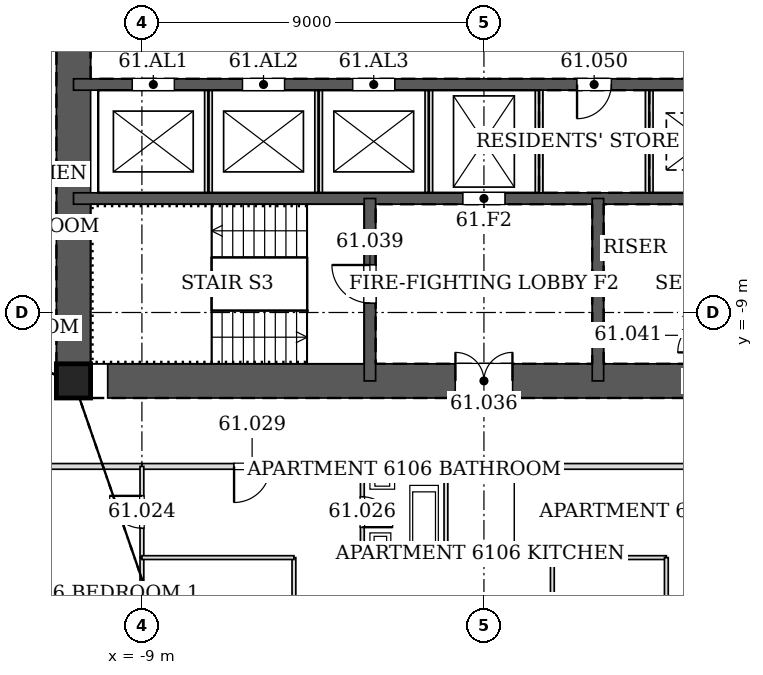
"""IFC4 building model, lengths in metres.
Left out: names, types, materials, properties, quantities, classifications, styles, units other than length and angle.
Written with IfcOpenShell. Run it as: python <this file> out.ifc"""

import sys

from ifc_helpers import new_model, si_unit, direction, frame, frame_2d, origin, origin_2d, place, context, subcontext, project, spatial, rectangle, hollow_rectangle, extrude, element, fill, save


model = new_model("IFC4")
c1 = context("Model", 3, precision=1e-05, world=origin(), true_north=direction((0.0, 1.0)))
c2 = subcontext(c1, "Body", "Model", "MODEL_VIEW")
j1 = project(units=[si_unit("LENGTHUNIT", "METRE"), si_unit("PLANEANGLEUNIT", "RADIAN")], contexts=[c1])
p1 = place(None, origin())
s1 = spatial("IfcSite", under=j1, at=p1, CompositionType="ELEMENT")
p2 = place(p1, origin())
s2 = spatial("IfcBuilding", under=s1, at=p2, CompositionType="ELEMENT")
p3 = place(p2, frame((0.0, 0.0, 255.0)))
s3 = spatial("IfcBuildingStorey", under=s2, at=p3, CompositionType="ELEMENT", Elevation=255.0)
p4 = place(p3, frame((-10.8, -10.8, 0.0), z_axis=(0.0, 0.0, 1.0), x_axis=(1.0, 0.0, 0.0)))
e1 = element("IfcColumn", 1, at=p4, inside=s3, PredefinedType="COLUMN", context=c2, shape_type="SweptSolid", body=[
    extrude(hollow_rectangle(XDim=0.9, YDim=0.9, WallThickness=0.04, at=origin_2d()), origin(), (0.0, 0.0, 1.0), 3.4),
])
p5 = place(p3, frame((-10.8, -10.8, 0.0), z_axis=(0.0, 0.0, 1.0), x_axis=(1.0, 0.0, 0.0)))
e2 = element("IfcWall", 2, at=p5, inside=s3, PredefinedType="SOLIDWALL", context=c2, shape_type="SweptSolid", body=[
    extrude(rectangle(XDim=21.6, YDim=0.9, at=frame_2d((10.8, 0.0))), origin(), (0.0, 0.0, 1.0), 3.4),
])
p6 = place(p5, frame((10.05, 0.0, 0.0)))
e3 = element("IfcOpeningElement", 3, at=p6, cuts=e2, PredefinedType="OPENING", context=c2, shape_type="SweptSolid", body=[
    extrude(rectangle(XDim=1.5, YDim=2.1, at=frame_2d((0.75, 1.05))), frame((0.0, 0.46, 0.0), z_axis=(0.0, -1.0, 0.0), x_axis=(1.0, 0.0, 0.0)), (0.0, 0.0, 1.0), 0.92),
])
p7 = place(p5, frame((17.1, 0.0, 0.0)))
e4 = element("IfcOpeningElement", 4, at=p7, cuts=e2, PredefinedType="OPENING", context=c2, shape_type="SweptSolid", body=[
    extrude(rectangle(XDim=0.9, YDim=2.1, at=frame_2d((0.45, 1.05))), frame((0.0, 0.46, 0.0), z_axis=(0.0, -1.0, 0.0), x_axis=(1.0, 0.0, 0.0)), (0.0, 0.0, 1.0), 0.92),
])
p8 = place(p3, frame((-10.8, 10.8, 0.0), z_axis=(0.0, 0.0, 1.0), x_axis=(0.0, -1.0, 0.0)))
e5 = element("IfcWall", 5, at=p8, inside=s3, PredefinedType="SOLIDWALL", context=c2, shape_type="SweptSolid", body=[
    extrude(rectangle(XDim=21.6, YDim=0.9, at=frame_2d((10.8, 0.0))), origin(), (0.0, 0.0, 1.0), 3.4),
])
p9 = place(p8, frame((8.7, 0.0, 0.0)))
e6 = element("IfcOpeningElement", 6, at=p9, cuts=e5, PredefinedType="OPENING", context=c2, shape_type="SweptSolid", body=[
    extrude(rectangle(XDim=1.2, YDim=2.1, at=frame_2d((0.6, 1.05))), frame((0.0, 0.46, 0.0), z_axis=(0.0, -1.0, 0.0), x_axis=(1.0, 0.0, 0.0)), (0.0, 0.0, 1.0), 0.92),
])
p10 = place(p8, frame((11.7, 0.0, 0.0)))
e7 = element("IfcOpeningElement", 7, at=p10, cuts=e5, PredefinedType="OPENING", context=c2, shape_type="SweptSolid", body=[
    extrude(rectangle(XDim=1.2, YDim=2.1, at=frame_2d((0.6, 1.05))), frame((0.0, 0.46, 0.0), z_axis=(0.0, -1.0, 0.0), x_axis=(1.0, 0.0, 0.0)), (0.0, 0.0, 1.0), 0.92),
])
p11 = place(p3, frame((-10.8, -3.0, 0.0), z_axis=(0.0, 0.0, 1.0), x_axis=(1.0, 0.0, 0.0)))
e8 = element("IfcWall", 8, at=p11, inside=s3, PredefinedType="SOLIDWALL", context=c2, shape_type="SweptSolid", body=[
    extrude(rectangle(XDim=21.6, YDim=0.3, at=frame_2d((10.8, 0.0))), origin(), (0.0, 0.0, 1.0), 3.4),
])
p12 = place(p11, frame((13.25, 0.0, 0.0)))
e9 = element("IfcOpeningElement", 9, at=p12, cuts=e8, PredefinedType="OPENING", context=c2, shape_type="SweptSolid", body=[
    extrude(rectangle(XDim=0.9, YDim=2.1, at=frame_2d((0.45, 1.05))), frame((0.0, 0.16, 0.0), z_axis=(0.0, -1.0, 0.0), x_axis=(1.0, 0.0, 0.0)), (0.0, 0.0, 1.0), 0.32),
])
p13 = place(p11, frame((1.55, 0.0, 0.0)))
e10 = element("IfcOpeningElement", 10, at=p13, cuts=e8, PredefinedType="OPENING", context=c2, shape_type="SweptSolid", body=[
    extrude(rectangle(XDim=1.1, YDim=2.1, at=frame_2d((0.55, 1.05))), frame((0.0, 0.16, 0.0), z_axis=(0.0, -1.0, 0.0), x_axis=(1.0, 0.0, 0.0)), (0.0, 0.0, 1.0), 0.32),
])
p14 = place(p11, frame((4.45, 0.0, 0.0)))
e11 = element("IfcOpeningElement", 11, at=p14, cuts=e8, PredefinedType="OPENING", context=c2, shape_type="SweptSolid", body=[
    extrude(rectangle(XDim=1.1, YDim=2.1, at=frame_2d((0.55, 1.05))), frame((0.0, 0.16, 0.0), z_axis=(0.0, -1.0, 0.0), x_axis=(1.0, 0.0, 0.0)), (0.0, 0.0, 1.0), 0.32),
])
p15 = place(p11, frame((7.35, 0.0, 0.0)))
e12 = element("IfcOpeningElement", 12, at=p15, cuts=e8, PredefinedType="OPENING", context=c2, shape_type="SweptSolid", body=[
    extrude(rectangle(XDim=1.1, YDim=2.1, at=frame_2d((0.55, 1.05))), frame((0.0, 0.16, 0.0), z_axis=(0.0, -1.0, 0.0), x_axis=(1.0, 0.0, 0.0)), (0.0, 0.0, 1.0), 0.32),
])
p16 = place(p3, frame((-10.8, -6.0, 0.0), z_axis=(0.0, 0.0, 1.0), x_axis=(1.0, 0.0, 0.0)))
e13 = element("IfcWall", 13, at=p16, inside=s3, PredefinedType="SOLIDWALL", context=c2, shape_type="SweptSolid", body=[
    extrude(rectangle(XDim=21.6, YDim=0.3, at=frame_2d((10.8, 0.0))), origin(), (0.0, 0.0, 1.0), 3.4),
])
p17 = place(p16, frame((10.25, 0.0, 0.0)))
e14 = element("IfcOpeningElement", 14, at=p17, cuts=e13, PredefinedType="OPENING", context=c2, shape_type="SweptSolid", body=[
    extrude(rectangle(XDim=1.1, YDim=2.1, at=frame_2d((0.55, 1.05))), frame((0.0, 0.16, 0.0), z_axis=(0.0, -1.0, 0.0), x_axis=(1.0, 0.0, 0.0)), (0.0, 0.0, 1.0), 0.32),
])
p18 = place(p3, frame((-3.0, -6.0, 0.0), z_axis=(0.0, 0.0, 1.0), x_axis=(0.0, -1.0, 0.0)))
e15 = element("IfcWall", 15, at=p18, inside=s3, PredefinedType="SOLIDWALL", context=c2, shape_type="SweptSolid", body=[
    extrude(rectangle(XDim=4.8, YDim=0.3, at=frame_2d((2.4, 0.0))), origin(), (0.0, 0.0, 1.0), 3.4),
])
p19 = place(p18, frame((1.75, 0.0, 0.0)))
e16 = element("IfcOpeningElement", 16, at=p19, cuts=e15, PredefinedType="OPENING", context=c2, shape_type="SweptSolid", body=[
    extrude(rectangle(XDim=1.0, YDim=2.1, at=frame_2d((0.5, 1.05))), frame((0.0, 0.16, 0.0), z_axis=(0.0, -1.0, 0.0), x_axis=(1.0, 0.0, 0.0)), (0.0, 0.0, 1.0), 0.32),
])
p20 = place(p3, frame((3.0, -6.0, 0.0), z_axis=(0.0, 0.0, 1.0), x_axis=(0.0, -1.0, 0.0)))
e17 = element("IfcWall", 17, at=p20, inside=s3, PredefinedType="SOLIDWALL", context=c2, shape_type="SweptSolid", body=[
    extrude(rectangle(XDim=4.8, YDim=0.3, at=frame_2d((2.4, 0.0))), origin(), (0.0, 0.0, 1.0), 3.4),
])
p21 = place(p3, frame((-13.05, -13.05, 0.0), z_axis=(0.0, 0.0, 1.0), x_axis=(1.0, 0.0, 0.0)))
e18 = element("IfcWall", 18, at=p21, inside=s3, PredefinedType="PARTITIONING", context=c2, shape_type="SweptSolid", body=[
    extrude(rectangle(XDim=4.051, YDim=0.15, at=frame_2d((2.025, 0.0))), origin(), (0.0, 0.0, 1.0), 2.349),
])
p22 = place(p3, frame((-3.201, -13.05, 0.0), z_axis=(0.0, 0.0, 1.0), x_axis=(1.0, 0.0, 0.0)))
e19 = element("IfcWall", 19, at=p22, inside=s3, PredefinedType="PARTITIONING", context=c2, shape_type="SweptSolid", body=[
    extrude(rectangle(XDim=2.202, YDim=0.15, at=frame_2d((1.101, 0.0))), origin(), (0.0, 0.0, 1.0), 2.662),
])
p23 = place(p3, frame((-1.001, -13.05, 0.0), z_axis=(0.0, 0.0, 1.0), x_axis=(1.0, 0.0, 0.0)))
e20 = element("IfcWall", 20, at=p23, inside=s3, PredefinedType="PARTITIONING", context=c2, shape_type="SweptSolid", body=[
    extrude(rectangle(XDim=0.819, YDim=0.15, at=frame_2d((0.409, 0.0))), origin(), (0.0, 0.0, 1.0), 2.662),
])
p24 = place(p3, frame((0.182, -13.05, 0.0), z_axis=(0.0, 0.0, 1.0), x_axis=(1.0, 0.0, 0.0)))
e21 = element("IfcWall", 21, at=p24, inside=s3, PredefinedType="PARTITIONING", context=c2, shape_type="SweptSolid", body=[
    extrude(rectangle(XDim=0.619, YDim=0.15, at=frame_2d((0.309, 0.0))), origin(), (0.0, 0.0, 1.0), 2.662),
])
p25 = place(p3, frame((-0.182, -13.05, 0.0), z_axis=(0.0, 0.0, 1.0), x_axis=(1.0, 0.0, 0.0)))
e22 = element("IfcWall", 22, at=p25, inside=s3, PredefinedType="PARTITIONING", context=c2, shape_type="SweptSolid", body=[
    extrude(rectangle(XDim=0.365, YDim=0.15, at=frame_2d((0.182, 0.0))), origin(), (0.0, 0.0, 1.0), 2.268),
])
p26 = place(p3, frame((-9.001, -13.05, 0.0), z_axis=(0.0, 0.0, 1.0), x_axis=(1.0, 0.0, 0.0)))
e23 = element("IfcWall", 23, at=p26, inside=s3, PredefinedType="PARTITIONING", context=c2, shape_type="SweptSolid", body=[
    extrude(rectangle(XDim=5.802, YDim=0.15, at=frame_2d((2.901, 0.0))), origin(), (0.0, 0.0, 1.0), 2.662),
])
p27 = place(p26, frame((2.426, 0.0, 0.0)))
e24 = element("IfcOpeningElement", 24, at=p27, cuts=e23, PredefinedType="OPENING", context=c2, shape_type="SweptSolid", body=[
    extrude(rectangle(XDim=0.95, YDim=2.1, at=frame_2d((0.475, 1.05))), frame((0.0, 0.085, 0.0), z_axis=(0.0, -1.0, 0.0), x_axis=(1.0, 0.0, 0.0)), (0.0, 0.0, 1.0), 0.17),
])
p28 = place(p3, frame((0.799, -13.05, 0.0), z_axis=(0.0, 0.0, 1.0), x_axis=(1.0, 0.0, 0.0)))
e25 = element("IfcWall", 25, at=p28, inside=s3, PredefinedType="PARTITIONING", context=c2, shape_type="SweptSolid", body=[
    extrude(rectangle(XDim=5.002, YDim=0.15, at=frame_2d((2.501, 0.0))), origin(), (0.0, 0.0, 1.0), 2.662),
])
p29 = place(p3, frame((-9.0, -20.393, 0.0), z_axis=(0.0, 0.0, 1.0), x_axis=(0.0, 1.0, 0.0)))
e26 = element("IfcWall", 26, at=p29, inside=s3, PredefinedType="PARTITIONING", context=c2, shape_type="SweptSolid", body=[
    extrude(rectangle(XDim=4.944, YDim=0.1, at=frame_2d((2.472, 0.0))), origin(), (0.0, 0.0, 1.0), 2.349),
])
p30 = place(p3, frame((-9.0, -15.451, 0.0), z_axis=(0.0, 0.0, 1.0), x_axis=(0.0, 1.0, 0.0)))
e27 = element("IfcWall", 27, at=p30, inside=s3, PredefinedType="PARTITIONING", context=c2, shape_type="SweptSolid", body=[
    extrude(rectangle(XDim=2.401, YDim=0.1, at=frame_2d((1.2, 0.0))), origin(), (0.0, 0.0, 1.0), 2.349),
])
p31 = place(p30, frame((0.775, 0.0, 0.0)))
e28 = element("IfcOpeningElement", 28, at=p31, cuts=e27, PredefinedType="OPENING", context=c2, shape_type="SweptSolid", body=[
    extrude(rectangle(XDim=0.85, YDim=2.1, at=frame_2d((0.425, 1.05))), frame((0.0, 0.06, 0.0), z_axis=(0.0, -1.0, 0.0), x_axis=(1.0, 0.0, 0.0)), (0.0, 0.0, 1.0), 0.12),
])
p32 = place(p3, frame((-5.0, -20.785, 0.0), z_axis=(0.0, 0.0, 1.0), x_axis=(0.0, 1.0, 0.0)))
e29 = element("IfcWall", 29, at=p32, inside=s3, PredefinedType="PARTITIONING", context=c2, shape_type="SweptSolid", body=[
    extrude(rectangle(XDim=5.335, YDim=0.1, at=frame_2d((2.667, 0.0))), origin(), (0.0, 0.0, 1.0), 2.662),
])
p33 = place(p32, frame((2.104, 0.0, 0.0)))
e30 = element("IfcOpeningElement", 30, at=p33, cuts=e29, PredefinedType="OPENING", context=c2, shape_type="SweptSolid", body=[
    extrude(rectangle(XDim=0.85, YDim=2.1, at=frame_2d((0.425, 1.05))), frame((0.0, 0.06, 0.0), z_axis=(0.0, -1.0, 0.0), x_axis=(1.0, 0.0, 0.0)), (0.0, 0.0, 1.0), 0.12),
])
p34 = place(p3, frame((-5.0, -15.45, 0.0), z_axis=(0.0, 0.0, 1.0), x_axis=(-1.0, 0.0, 0.0)))
e31 = element("IfcWall", 31, at=p34, inside=s3, PredefinedType="PARTITIONING", context=c2, shape_type="SweptSolid", body=[
    extrude(rectangle(XDim=4.0, YDim=0.1, at=frame_2d((2.0, 0.0))), origin(), (0.0, 0.0, 1.0), 2.349),
])
p35 = place(p3, frame((-1.0, -15.45, 0.0), z_axis=(0.0, 0.0, 1.0), x_axis=(0.0, 1.0, 0.0)))
e32 = element("IfcWall", 32, at=p35, inside=s3, PredefinedType="PARTITIONING", context=c2, shape_type="SweptSolid", body=[
    extrude(rectangle(XDim=2.4, YDim=0.1, at=frame_2d((1.2, 0.0))), origin(), (0.0, 0.0, 1.0), 2.662),
])
p36 = place(p3, frame((-3.2, -13.05, 0.0), z_axis=(0.0, 0.0, 1.0), x_axis=(0.0, -1.0, 0.0)))
e33 = element("IfcWall", 33, at=p36, inside=s3, PredefinedType="PARTITIONING", context=c2, shape_type="SweptSolid", body=[
    extrude(rectangle(XDim=2.4, YDim=0.1, at=frame_2d((1.2, 0.0))), origin(), (0.0, 0.0, 1.0), 2.662),
])
p37 = place(p36, frame((0.8, 0.0, 0.0)))
e34 = element("IfcOpeningElement", 34, at=p37, cuts=e33, PredefinedType="OPENING", context=c2, shape_type="SweptSolid", body=[
    extrude(rectangle(XDim=0.8, YDim=2.1, at=frame_2d((0.4, 1.05))), frame((0.0, 0.06, 0.0), z_axis=(0.0, -1.0, 0.0), x_axis=(1.0, 0.0, 0.0)), (0.0, 0.0, 1.0), 0.12),
])
p38 = place(p3, frame((-3.2, -15.45, 0.0), z_axis=(0.0, 0.0, 1.0), x_axis=(1.0, 0.0, 0.0)))
e35 = element("IfcWall", 35, at=p38, inside=s3, PredefinedType="PARTITIONING", context=c2, shape_type="SweptSolid", body=[
    extrude(rectangle(XDim=2.2, YDim=0.1, at=frame_2d((1.1, 0.0))), origin(), (0.0, 0.0, 1.0), 2.74),
])
p39 = place(p3, frame((1.8, -20.785, 0.0), z_axis=(0.0, 0.0, 1.0), x_axis=(0.0, 1.0, 0.0)))
e36 = element("IfcWall", 36, at=p39, inside=s3, PredefinedType="PARTITIONING", context=c2, shape_type="SweptSolid", body=[
    extrude(rectangle(XDim=5.335, YDim=0.1, at=frame_2d((2.667, 0.0))), origin(), (0.0, 0.0, 1.0), 2.662),
])
p40 = place(p39, frame((2.104, 0.0, 0.0)))
e37 = element("IfcOpeningElement", 37, at=p40, cuts=e36, PredefinedType="OPENING", context=c2, shape_type="SweptSolid", body=[
    extrude(rectangle(XDim=0.85, YDim=2.1, at=frame_2d((0.425, 1.05))), frame((0.0, 0.06, 0.0), z_axis=(0.0, -1.0, 0.0), x_axis=(1.0, 0.0, 0.0)), (0.0, 0.0, 1.0), 0.12),
])
p41 = place(p3, frame((1.8, -15.45, 0.0), z_axis=(0.0, 0.0, 1.0), x_axis=(1.0, 0.0, 0.0)))
e38 = element("IfcWall", 38, at=p41, inside=s3, PredefinedType="PARTITIONING", context=c2, shape_type="SweptSolid", body=[
    extrude(rectangle(XDim=3.0, YDim=0.1, at=frame_2d((1.5, 0.0))), origin(), (0.0, 0.0, 1.0), 2.74),
])
p42 = place(p3, frame((4.8, -15.45, 0.0), z_axis=(0.0, 0.0, 1.0), x_axis=(0.0, -1.0, 0.0)))
e39 = element("IfcWall", 39, at=p42, inside=s3, PredefinedType="PARTITIONING", context=c2, shape_type="SweptSolid", body=[
    extrude(rectangle(XDim=5.333, YDim=0.1, at=frame_2d((2.667, 0.0))), origin(), (0.0, 0.0, 1.0), 2.662),
])
for number, where, z_axis, x_axis in (
    (40, (-7.25, -5.85, 0.0), (0.0, 0.0, 1.0), (0.0, 1.0, 0.0)),
    (41, (-4.35, -5.85, 0.0), (0.0, 0.0, 1.0), (0.0, 1.0, 0.0)),
    (42, (-1.45, -5.85, 0.0), (0.0, 0.0, 1.0), (0.0, 1.0, 0.0)),
):
    element("IfcWall", number, at=place(p3, frame(where, z_axis=z_axis, x_axis=x_axis)), inside=s3, PredefinedType="PARTITIONING", context=c2, shape_type="SweptSolid", body=[
        extrude(rectangle(XDim=2.7, YDim=0.2, at=frame_2d((1.35, 0.0))), origin(), (0.0, 0.0, 1.0), 3.4),
    ])
for number, where, z_axis, x_axis in (
    (43, (1.45, -5.85, 0.0), (0.0, 0.0, 1.0), (0.0, 1.0, 0.0)),
    (44, (4.35, -5.85, 0.0), (0.0, 0.0, 1.0), (0.0, 1.0, 0.0)),
):
    element("IfcWall", number, at=place(p3, frame(where, z_axis=z_axis, x_axis=x_axis)), inside=s3, PredefinedType="PARTITIONING", context=c2, shape_type="SweptSolid", body=[
        extrude(rectangle(XDim=2.7, YDim=0.2, at=frame_2d((1.35, 0.0))), origin(), (0.0, 0.0, 1.0), 3.2),
    ])
p43 = place(p31, origin())
e45 = element("IfcDoor", 45, at=p43, inside=s3, OperationType="SINGLE_SWING_RIGHT", PredefinedType="DOOR", context=c2, shape_type="SweptSolid", body=[
    extrude(rectangle(XDim=0.85, YDim=2.1, at=frame_2d((0.425, 1.05))), frame((0.0, 0.025, 0.0), z_axis=(0.0, -1.0, 0.0), x_axis=(1.0, 0.0, 0.0)), (0.0, 0.0, 1.0), 0.05),
])
fill(e28, e45)
p44 = place(p37, origin())
e46 = element("IfcDoor", 46, at=p44, inside=s3, OperationType="SINGLE_SWING_RIGHT", PredefinedType="DOOR", context=c2, shape_type="SweptSolid", body=[
    extrude(rectangle(XDim=0.8, YDim=2.1, at=frame_2d((0.4, 1.05))), frame((0.0, 0.025, 0.0), z_axis=(0.0, -1.0, 0.0), x_axis=(1.0, 0.0, 0.0)), (0.0, 0.0, 1.0), 0.05),
])
fill(e34, e46)
p45 = place(p27, frame((0.95, 0.0, 0.0), z_axis=(0.0, 0.0, 1.0), x_axis=(-1.0, 0.0, 0.0)))
e47 = element("IfcDoor", 47, at=p45, inside=s3, OperationType="SINGLE_SWING_RIGHT", PredefinedType="DOOR", context=c2, shape_type="SweptSolid", body=[
    extrude(rectangle(XDim=0.95, YDim=2.1, at=frame_2d((0.475, 1.05))), frame((0.0, 0.025, 0.0), z_axis=(0.0, -1.0, 0.0), x_axis=(1.0, 0.0, 0.0)), (0.0, 0.0, 1.0), 0.05),
])
fill(e24, e47)
p46 = place(p6, origin())
e48 = element("IfcDoor", 48, at=p46, inside=s3, OperationType="DOUBLE_DOOR_SINGLE_SWING", PredefinedType="DOOR", context=c2, shape_type="SweptSolid", body=[
    extrude(rectangle(XDim=1.5, YDim=2.1, at=frame_2d((0.75, 1.05))), frame((0.0, 0.025, 0.0), z_axis=(0.0, -1.0, 0.0), x_axis=(1.0, 0.0, 0.0)), (0.0, 0.0, 1.0), 0.05),
])
fill(e3, e48)
p47 = place(p19, frame((1.0, 0.0, 0.0), z_axis=(0.0, 0.0, 1.0), x_axis=(-1.0, 0.0, 0.0)))
e49 = element("IfcDoor", 49, at=p47, inside=s3, OperationType="SINGLE_SWING_RIGHT", PredefinedType="DOOR", context=c2, shape_type="SweptSolid", body=[
    extrude(rectangle(XDim=1.0, YDim=2.1, at=frame_2d((0.5, 1.05))), frame((0.0, 0.025, 0.0), z_axis=(0.0, -1.0, 0.0), x_axis=(1.0, 0.0, 0.0)), (0.0, 0.0, 1.0), 0.05),
])
fill(e16, e49)
p48 = place(p12, frame((0.9, 0.0, 0.0), z_axis=(0.0, 0.0, 1.0), x_axis=(-1.0, 0.0, 0.0)))
e50 = element("IfcDoor", 50, at=p48, inside=s3, OperationType="SINGLE_SWING_RIGHT", PredefinedType="DOOR", context=c2, shape_type="SweptSolid", body=[
    extrude(rectangle(XDim=0.9, YDim=2.1, at=frame_2d((0.45, 1.05))), frame((0.0, 0.025, 0.0), z_axis=(0.0, -1.0, 0.0), x_axis=(1.0, 0.0, 0.0)), (0.0, 0.0, 1.0), 0.05),
])
fill(e9, e50)
p49 = place(p17, origin())
e51 = element("IfcDoor", 51, at=p49, inside=s3, OperationType="DOUBLE_DOOR_SLIDING", PredefinedType="DOOR", context=c2, shape_type="SweptSolid", body=[
    extrude(rectangle(XDim=1.1, YDim=2.1, at=frame_2d((0.55, 1.05))), frame((0.0, 0.025, 0.0), z_axis=(0.0, -1.0, 0.0), x_axis=(1.0, 0.0, 0.0)), (0.0, 0.0, 1.0), 0.05),
])
fill(e14, e51)
p50 = place(p13, origin())
e52 = element("IfcDoor", 52, at=p50, inside=s3, OperationType="DOUBLE_DOOR_SLIDING", PredefinedType="DOOR", context=c2, shape_type="SweptSolid", body=[
    extrude(rectangle(XDim=1.1, YDim=2.1, at=frame_2d((0.55, 1.05))), frame((0.0, 0.025, 0.0), z_axis=(0.0, -1.0, 0.0), x_axis=(1.0, 0.0, 0.0)), (0.0, 0.0, 1.0), 0.05),
])
fill(e10, e52)
p51 = place(p14, origin())
e53 = element("IfcDoor", 53, at=p51, inside=s3, OperationType="DOUBLE_DOOR_SLIDING", PredefinedType="DOOR", context=c2, shape_type="SweptSolid", body=[
    extrude(rectangle(XDim=1.1, YDim=2.1, at=frame_2d((0.55, 1.05))), frame((0.0, 0.025, 0.0), z_axis=(0.0, -1.0, 0.0), x_axis=(1.0, 0.0, 0.0)), (0.0, 0.0, 1.0), 0.05),
])
fill(e11, e53)
p52 = place(p15, origin())
e54 = element("IfcDoor", 54, at=p52, inside=s3, OperationType="DOUBLE_DOOR_SLIDING", PredefinedType="DOOR", context=c2, shape_type="SweptSolid", body=[
    extrude(rectangle(XDim=1.1, YDim=2.1, at=frame_2d((0.55, 1.05))), frame((0.0, 0.025, 0.0), z_axis=(0.0, -1.0, 0.0), x_axis=(1.0, 0.0, 0.0)), (0.0, 0.0, 1.0), 0.05),
])
fill(e12, e54)
save(model, sys.argv[1])
